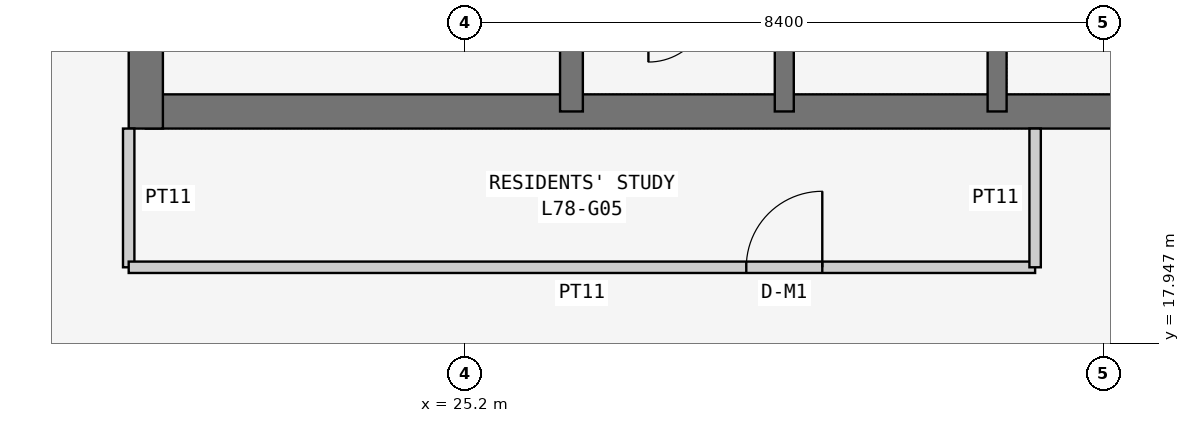
"""IFC4 building model, lengths in metres.
Left out: names, types, materials, properties, quantities, classifications, styles, units other than length and angle.
Written with IfcOpenShell. Run it as: python <this file> out.ifc"""

import sys

from ifc_helpers import new_model, si_unit, direction, frame, frame_2d, origin, place, context, subcontext, project, spatial, rectangle, extrude, element, fill, save


model = new_model("IFC4")
c1 = context("Model", 3, precision=1e-05, world=origin(), true_north=direction((0.0, 1.0)))
c2 = subcontext(c1, "Body", "Model", "MODEL_VIEW")
j1 = project(units=[si_unit("LENGTHUNIT", "METRE"), si_unit("PLANEANGLEUNIT", "RADIAN")], contexts=[c1])
p1 = place(None, origin())
s1 = spatial("IfcSite", under=j1, at=p1, CompositionType="ELEMENT")
p2 = place(p1, origin())
s2 = spatial("IfcBuilding", under=s1, at=p2, CompositionType="ELEMENT")
p3 = place(p2, frame((0.0, 0.0, 297.3)))
s3 = spatial("IfcBuildingStorey", under=s2, at=p3, CompositionType="ELEMENT", Elevation=297.3)
p4 = place(p3, frame((21.0, 21.0, 0.0), z_axis=(0.0, 0.0, 1.0), x_axis=(1.0, 0.0, 0.0)))
e1 = element("IfcWall", 1, at=p4, inside=s3, PredefinedType="SHEAR", context=c2, shape_type="SweptSolid", body=[
    extrude(rectangle(XDim=17.025, YDim=0.45, at=frame_2d((8.512, 0.0))), origin(), (0.0, 0.0, 1.0), 3.6),
])
p5 = place(p3, frame((21.0, 37.8, 0.0), z_axis=(0.0, 0.0, 1.0), x_axis=(0.0, -1.0, 0.0)))
e2 = element("IfcWall", 2, at=p5, inside=s3, PredefinedType="SHEAR", context=c2, shape_type="SweptSolid", body=[
    extrude(rectangle(XDim=17.025, YDim=0.45, at=frame_2d((8.513, 0.0))), origin(), (0.0, 0.0, 1.0), 3.6),
])
p6 = place(p5, frame((5.4, 0.0, 0.0)))
e3 = element("IfcOpeningElement", 3, at=p6, cuts=e2, PredefinedType="OPENING", context=c2, shape_type="SweptSolid", body=[
    extrude(rectangle(XDim=1.2, YDim=2.1, at=frame_2d((0.6, 1.05))), frame((0.0, 0.235, 0.0), z_axis=(0.0, -1.0, 0.0), x_axis=(1.0, 0.0, 0.0)), (0.0, 0.0, 1.0), 0.47),
])
p7 = place(p3, frame((26.6, 21.0, 0.0), z_axis=(0.0, 0.0, 1.0), x_axis=(0.0, 1.0, 0.0)))
e4 = element("IfcWall", 4, at=p7, inside=s3, PredefinedType="SHEAR", context=c2, shape_type="SweptSolid", body=[
    extrude(rectangle(XDim=16.8, YDim=0.3, at=frame_2d((8.4, 0.0))), origin(), (0.0, 0.0, 1.0), 3.6),
])
p8 = place(p7, frame((10.4, 0.0, 0.0)))
e5 = element("IfcOpeningElement", 5, at=p8, cuts=e4, PredefinedType="OPENING", context=c2, shape_type="SweptSolid", body=[
    extrude(rectangle(XDim=1.2, YDim=2.1, at=frame_2d((0.6, 1.05))), frame((0.0, 0.16, 0.0), z_axis=(0.0, -1.0, 0.0), x_axis=(1.0, 0.0, 0.0)), (0.0, 0.0, 1.0), 0.32),
])
for number, where, z_axis, x_axis in (
    (6, (29.4, 21.0, 0.0), (0.0, 0.0, 1.0), (0.0, 1.0, 0.0)),
    (7, (32.2, 21.0, 0.0), (0.0, 0.0, 1.0), (0.0, 1.0, 0.0)),
):
    element("IfcWall", number, at=place(p3, frame(where, z_axis=z_axis, x_axis=x_axis)), inside=s3, PredefinedType="SHEAR", context=c2, shape_type="SweptSolid", body=[
        extrude(rectangle(XDim=3.2, YDim=0.25, at=frame_2d((1.6, 0.0))), origin(), (0.0, 0.0, 1.0), 3.6),
    ])
p9 = place(p3, frame((20.775, 20.775, 0.0), z_axis=(0.0, 0.0, 1.0), x_axis=(0.0, -1.0, 0.0)))
e8 = element("IfcWall", 8, at=p9, inside=s3, PredefinedType="PARTITIONING", context=c2, shape_type="SweptSolid", body=[
    extrude(rectangle(XDim=1.825, YDim=0.15, at=frame_2d((0.913, 0.0))), origin(), (0.0, 0.0, 1.0), 3.35),
])
p10 = place(p3, frame((20.775, 18.95, 0.0), z_axis=(0.0, 0.0, 1.0), x_axis=(1.0, 0.0, 0.0)))
e9 = element("IfcWall", 9, at=p10, inside=s3, PredefinedType="PARTITIONING", context=c2, shape_type="SweptSolid", body=[
    extrude(rectangle(XDim=11.925, YDim=0.15, at=frame_2d((5.962, 0.0))), origin(), (0.0, 0.0, 1.0), 3.35),
])
p11 = place(p10, frame((8.125, 0.0, 0.0)))
e10 = element("IfcOpeningElement", 10, at=p11, cuts=e9, PredefinedType="OPENING", context=c2, shape_type="SweptSolid", body=[
    extrude(rectangle(XDim=1.0, YDim=2.1, at=frame_2d((0.5, 1.05))), frame((0.0, 0.085, 0.0), z_axis=(0.0, -1.0, 0.0), x_axis=(1.0, 0.0, 0.0)), (0.0, 0.0, 1.0), 0.17),
])
p12 = place(p3, frame((32.7, 18.95, 0.0), z_axis=(0.0, 0.0, 1.0), x_axis=(0.0, 1.0, 0.0)))
e11 = element("IfcWall", 11, at=p12, inside=s3, PredefinedType="PARTITIONING", context=c2, shape_type="SweptSolid", body=[
    extrude(rectangle(XDim=1.825, YDim=0.15, at=frame_2d((0.913, 0.0))), origin(), (0.0, 0.0, 1.0), 3.35),
])
p13 = place(p11, origin())
e12 = element("IfcDoor", 12, at=p13, inside=s3, OperationType="SINGLE_SWING_RIGHT", PredefinedType="DOOR", context=c2, shape_type="SweptSolid", body=[
    extrude(rectangle(XDim=1.0, YDim=2.1, at=frame_2d((0.5, 1.05))), frame((0.0, 0.025, 0.0), z_axis=(0.0, -1.0, 0.0), x_axis=(1.0, 0.0, 0.0)), (0.0, 0.0, 1.0), 0.05),
])
fill(e10, e12)
save(model, sys.argv[1])
